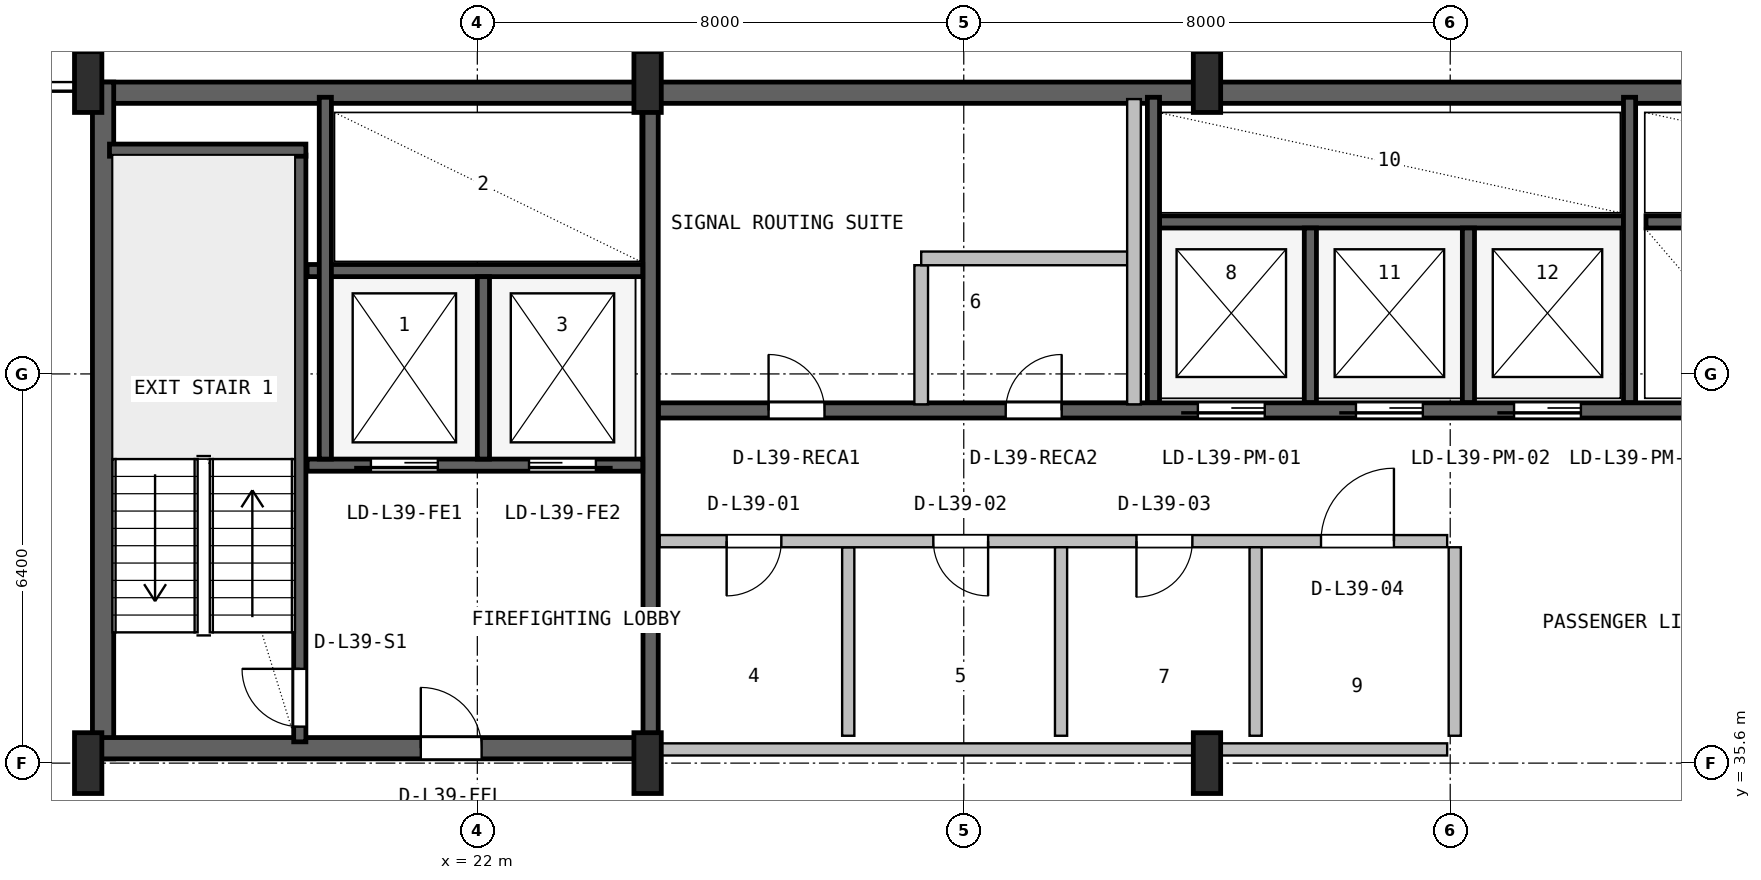
"""IFC4 building model, lengths in metres.
Left out: names, types, materials, properties, quantities, classifications, styles, units other than length and angle.
Written with IfcOpenShell. Run it as: python <this file> out.ifc"""

import sys

from ifc_helpers import new_model, si_unit, direction, frame, frame_2d, origin, origin_2d, place, context, subcontext, project, spatial, rectangle, i_section, extrude, source, transform, mapped, element, fill, save


model = new_model("IFC4")
c1 = context("Model", 3, precision=1e-05, world=origin(), true_north=direction((0.0, 1.0)))
c2 = subcontext(c1, "Body", "Model", "MODEL_VIEW")
j1 = project(units=[si_unit("LENGTHUNIT", "METRE"), si_unit("PLANEANGLEUNIT", "RADIAN")], contexts=[c1])
p1 = place(None, origin())
s1 = spatial("IfcSite", under=j1, at=p1, CompositionType="ELEMENT")
p2 = place(p1, origin())
s2 = spatial("IfcBuilding", under=s1, at=p2, CompositionType="ELEMENT")
p3 = place(p2, frame((0.0, 0.0, 161.0)))
s3 = spatial("IfcBuildingStorey", under=s2, at=p3, CompositionType="ELEMENT", Elevation=161.0)
p4 = place(p3, frame((15.6, 46.625, 0.0), z_axis=(0.0, 0.0, 1.0), x_axis=(1.0, 0.0, 0.0)))
e1 = element("IfcWall", 1, at=p4, inside=s3, PredefinedType="SHEAR", context=c2, shape_type="SweptSolid", body=[
    extrude(rectangle(XDim=36.8, YDim=0.35, at=frame_2d((18.4, 0.0))), origin(), (0.0, 0.0, 1.0), 3.55),
])
p5 = place(p3, frame((15.845, 35.67, 0.0), z_axis=(0.0, 0.0, 1.0), x_axis=(0.0, 1.0, 0.0)))
e2 = element("IfcWall", 2, at=p5, inside=s3, PredefinedType="SHEAR", context=c2, shape_type="SweptSolid", body=[
    extrude(rectangle(XDim=11.13, YDim=0.35, at=frame_2d((5.565, 0.0))), origin(), (0.0, 0.0, 1.0), 3.55),
])
p6 = place(p3, frame((15.67, 35.845, 0.0), z_axis=(0.0, 0.0, 1.0), x_axis=(1.0, 0.0, 0.0)))
e3 = element("IfcWall", 3, at=p6, inside=s3, PredefinedType="SHEAR", context=c2, shape_type="SweptSolid", body=[
    extrude(rectangle(XDim=9.13, YDim=0.35, at=frame_2d((4.565, 0.0))), origin(), (0.0, 0.0, 1.0), 3.55),
])
p7 = place(p6, frame((5.4, 0.0, 0.0)))
e4 = element("IfcOpeningElement", 4, at=p7, cuts=e3, PredefinedType="OPENING", context=c2, shape_type="SweptSolid", body=[
    extrude(rectangle(XDim=1.0, YDim=2.1, at=frame_2d((0.5, 1.05))), frame((0.0, 0.185, 0.0), z_axis=(0.0, -1.0, 0.0), x_axis=(1.0, 0.0, 0.0)), (0.0, 0.0, 1.0), 0.37),
])
m1 = source(origin(), c2, "Body", "SweptSolid", [
    extrude(i_section(OverallWidth=0.45, OverallDepth=1.0, WebThickness=0.016, FlangeThickness=0.03, FilletRadius=0.016, at=origin_2d()), origin(), (0.0, 0.0, 1.0), 3.8),
])
for number, where, z_axis, x_axis in (
    (5, (15.6, 35.6, 0.0), (0.0, 0.0, 1.0), (1.0, 0.0, 0.0)),
    (6, (15.6, 46.8, 0.0), (0.0, 0.0, 1.0), (1.0, 0.0, 0.0)),
    (7, (24.8, 35.6, 0.0), (0.0, 0.0, 1.0), (1.0, 0.0, 0.0)),
    (8, (24.8, 46.8, 0.0), (0.0, 0.0, 1.0), (1.0, 0.0, 0.0)),
    (9, (34.0, 35.6, 0.0), (0.0, 0.0, 1.0), (1.0, 0.0, 0.0)),
    (10, (34.0, 46.8, 0.0), (0.0, 0.0, 1.0), (1.0, 0.0, 0.0)),
):
    element("IfcColumn", number, at=place(p3, frame(where, z_axis=z_axis, x_axis=x_axis)), inside=s3, PredefinedType="COLUMN", context=c2, shape_type="MappedRepresentation", body=[
        mapped(m1, transform((0.0, 0.0, 0.0), x_axis=(1.0, 0.0, 0.0), y_axis=(0.0, 1.0, 0.0), z_axis=(0.0, 0.0, 1.0), scale=1.0)),
    ])
p8 = place(p3, frame((19.08, 35.95, 0.0), z_axis=(0.0, 0.0, 1.0), x_axis=(0.0, 1.0, 0.0)))
e11 = element("IfcWall", 11, at=p8, inside=s3, PredefinedType="SHEAR", context=c2, shape_type="SweptSolid", body=[
    extrude(rectangle(XDim=9.65, YDim=0.2, at=frame_2d((4.825, 0.0))), origin(), (0.0, 0.0, 1.0), 3.55),
])
p9 = place(p8, frame((0.25, 0.0, 0.0)))
e12 = element("IfcOpeningElement", 12, at=p9, cuts=e11, PredefinedType="OPENING", context=c2, shape_type="SweptSolid", body=[
    extrude(rectangle(XDim=0.95, YDim=2.1, at=frame_2d((0.475, 1.05))), frame((0.0, 0.11, 0.0), z_axis=(0.0, -1.0, 0.0), x_axis=(1.0, 0.0, 0.0)), (0.0, 0.0, 1.0), 0.22),
])
p10 = place(p3, frame((15.95, 45.68, 0.0), z_axis=(0.0, 0.0, 1.0), x_axis=(1.0, 0.0, 0.0)))
e13 = element("IfcWall", 13, at=p10, inside=s3, PredefinedType="SHEAR", context=c2, shape_type="SweptSolid", body=[
    extrude(rectangle(XDim=3.23, YDim=0.2, at=frame_2d((1.615, 0.0))), origin(), (0.0, 0.0, 1.0), 3.55),
])
p11 = place(p3, frame((24.85, 36.05, 0.0), z_axis=(0.0, 0.0, 1.0), x_axis=(0.0, 1.0, 0.0)))
e14 = element("IfcWall", 14, at=p11, inside=s3, PredefinedType="SHEAR", context=c2, shape_type="SweptSolid", body=[
    extrude(rectangle(XDim=10.45, YDim=0.25, at=frame_2d((5.225, 0.0))), origin(), (0.0, 0.0, 1.0), 3.55),
])
p12 = place(p3, frame((19.2, 40.5, 0.0), z_axis=(0.0, 0.0, 1.0), x_axis=(1.0, 0.0, 0.0)))
e15 = element("IfcWall", 15, at=p12, inside=s3, PredefinedType="SHEAR", context=c2, shape_type="SweptSolid", body=[
    extrude(rectangle(XDim=5.52, YDim=0.2, at=frame_2d((2.76, 0.0))), origin(), (0.0, 0.0, 1.0), 3.55),
])
p13 = place(p12, frame((1.05, 0.0, 0.0)))
e16 = element("IfcOpeningElement", 16, at=p13, cuts=e15, PredefinedType="OPENING", context=c2, shape_type="SweptSolid", body=[
    extrude(rectangle(XDim=1.1, YDim=2.18, at=frame_2d((0.55, 1.09))), frame((0.0, 0.11, 0.0), z_axis=(0.0, -1.0, 0.0), x_axis=(1.0, 0.0, 0.0)), (0.0, 0.0, 1.0), 0.22),
])
p14 = place(p12, frame((3.65, 0.0, 0.0)))
e17 = element("IfcOpeningElement", 17, at=p14, cuts=e15, PredefinedType="OPENING", context=c2, shape_type="SweptSolid", body=[
    extrude(rectangle(XDim=1.1, YDim=2.18, at=frame_2d((0.55, 1.09))), frame((0.0, 0.11, 0.0), z_axis=(0.0, -1.0, 0.0), x_axis=(1.0, 0.0, 0.0)), (0.0, 0.0, 1.0), 0.22),
])
p15 = place(p3, frame((19.2, 43.7, 0.0), z_axis=(0.0, 0.0, 1.0), x_axis=(1.0, 0.0, 0.0)))
e18 = element("IfcWall", 18, at=p15, inside=s3, PredefinedType="SHEAR", context=c2, shape_type="SweptSolid", body=[
    extrude(rectangle(XDim=5.52, YDim=0.2, at=frame_2d((2.76, 0.0))), origin(), (0.0, 0.0, 1.0), 3.55),
])
p16 = place(p3, frame((22.1, 40.6, 0.0), z_axis=(0.0, 0.0, 1.0), x_axis=(0.0, 1.0, 0.0)))
e19 = element("IfcWall", 19, at=p16, inside=s3, PredefinedType="SHEAR", context=c2, shape_type="SweptSolid", body=[
    extrude(rectangle(XDim=3.0, YDim=0.2, at=frame_2d((1.5, 0.0))), origin(), (0.0, 0.0, 1.0), 3.55),
])
p17 = place(p3, frame((19.5, 40.6, 0.0), z_axis=(0.0, 0.0, 1.0), x_axis=(0.0, 1.0, 0.0)))
e20 = element("IfcWall", 20, at=p17, inside=s3, PredefinedType="SHEAR", context=c2, shape_type="SweptSolid", body=[
    extrude(rectangle(XDim=5.95, YDim=0.2, at=frame_2d((2.975, 0.0))), origin(), (0.0, 0.0, 1.0), 3.55),
])
p18 = place(p3, frame((24.98, 41.4, 0.0), z_axis=(0.0, 0.0, 1.0), x_axis=(1.0, 0.0, 0.0)))
e21 = element("IfcWall", 21, at=p18, inside=s3, PredefinedType="SHEAR", context=c2, shape_type="SweptSolid", body=[
    extrude(rectangle(XDim=23.82, YDim=0.25, at=frame_2d((11.91, 0.0))), origin(), (0.0, 0.0, 1.0), 3.55),
])
p19 = place(p18, frame((8.87, 0.0, 0.0)))
e22 = element("IfcOpeningElement", 22, at=p19, cuts=e21, PredefinedType="OPENING", context=c2, shape_type="SweptSolid", body=[
    extrude(rectangle(XDim=1.1, YDim=2.18, at=frame_2d((0.55, 1.09))), frame((0.0, 0.135, 0.0), z_axis=(0.0, -1.0, 0.0), x_axis=(1.0, 0.0, 0.0)), (0.0, 0.0, 1.0), 0.27),
])
p20 = place(p18, frame((11.47, 0.0, 0.0)))
e23 = element("IfcOpeningElement", 23, at=p20, cuts=e21, PredefinedType="OPENING", context=c2, shape_type="SweptSolid", body=[
    extrude(rectangle(XDim=1.1, YDim=2.18, at=frame_2d((0.55, 1.09))), frame((0.0, 0.135, 0.0), z_axis=(0.0, -1.0, 0.0), x_axis=(1.0, 0.0, 0.0)), (0.0, 0.0, 1.0), 0.27),
])
p21 = place(p18, frame((14.07, 0.0, 0.0)))
e24 = element("IfcOpeningElement", 24, at=p21, cuts=e21, PredefinedType="OPENING", context=c2, shape_type="SweptSolid", body=[
    extrude(rectangle(XDim=1.1, YDim=2.18, at=frame_2d((0.55, 1.09))), frame((0.0, 0.135, 0.0), z_axis=(0.0, -1.0, 0.0), x_axis=(1.0, 0.0, 0.0)), (0.0, 0.0, 1.0), 0.27),
])
p22 = place(p18, frame((1.81, 0.0, 0.0)))
e25 = element("IfcOpeningElement", 25, at=p22, cuts=e21, PredefinedType="OPENING", context=c2, shape_type="SweptSolid", body=[
    extrude(rectangle(XDim=0.92, YDim=2.08, at=frame_2d((0.46, 1.04))), frame((0.0, 0.135, 0.0), z_axis=(0.0, -1.0, 0.0), x_axis=(1.0, 0.0, 0.0)), (0.0, 0.0, 1.0), 0.27),
])
p23 = place(p18, frame((5.71, 0.0, 0.0)))
e26 = element("IfcOpeningElement", 26, at=p23, cuts=e21, PredefinedType="OPENING", context=c2, shape_type="SweptSolid", body=[
    extrude(rectangle(XDim=0.92, YDim=2.08, at=frame_2d((0.46, 1.04))), frame((0.0, 0.135, 0.0), z_axis=(0.0, -1.0, 0.0), x_axis=(1.0, 0.0, 0.0)), (0.0, 0.0, 1.0), 0.27),
])
p24 = place(p3, frame((33.22, 44.5, 0.0), z_axis=(0.0, 0.0, 1.0), x_axis=(1.0, 0.0, 0.0)))
e27 = element("IfcWall", 27, at=p24, inside=s3, PredefinedType="SHEAR", context=c2, shape_type="SweptSolid", body=[
    extrude(rectangle(XDim=7.63, YDim=0.2, at=frame_2d((3.815, 0.0))), origin(), (0.0, 0.0, 1.0), 3.55),
])
p25 = place(p3, frame((33.12, 41.53, 0.0), z_axis=(0.0, 0.0, 1.0), x_axis=(0.0, 1.0, 0.0)))
e28 = element("IfcWall", 28, at=p25, inside=s3, PredefinedType="SHEAR", context=c2, shape_type="SweptSolid", body=[
    extrude(rectangle(XDim=5.02, YDim=0.2, at=frame_2d((2.51, 0.0))), origin(), (0.0, 0.0, 1.0), 3.55),
])
for number, where, z_axis, x_axis in (
    (29, (35.7, 41.53, 0.0), (0.0, 0.0, 1.0), (0.0, 1.0, 0.0)),
    (30, (38.3, 41.53, 0.0), (0.0, 0.0, 1.0), (0.0, 1.0, 0.0)),
):
    element("IfcWall", number, at=place(p3, frame(where, z_axis=z_axis, x_axis=x_axis)), inside=s3, PredefinedType="SHEAR", context=c2, shape_type="SweptSolid", body=[
        extrude(rectangle(XDim=2.87, YDim=0.2, at=frame_2d((1.435, 0.0))), origin(), (0.0, 0.0, 1.0), 3.55),
    ])
p26 = place(p3, frame((40.95, 41.53, 0.0), z_axis=(0.0, 0.0, 1.0), x_axis=(0.0, 1.0, 0.0)))
e31 = element("IfcWall", 31, at=p26, inside=s3, PredefinedType="SHEAR", context=c2, shape_type="SweptSolid", body=[
    extrude(rectangle(XDim=5.02, YDim=0.2, at=frame_2d((2.51, 0.0))), origin(), (0.0, 0.0, 1.0), 3.55),
])
p27 = place(p3, frame((41.22, 44.5, 0.0), z_axis=(0.0, 0.0, 1.0), x_axis=(1.0, 0.0, 0.0)))
e32 = element("IfcWall", 32, at=p27, inside=s3, PredefinedType="SHEAR", context=c2, shape_type="SweptSolid", body=[
    extrude(rectangle(XDim=7.58, YDim=0.2, at=frame_2d((3.79, 0.0))), origin(), (0.0, 0.0, 1.0), 3.55),
])
p28 = place(p3, frame((25.0, 35.825, 0.0), z_axis=(0.0, 0.0, 1.0), x_axis=(1.0, 0.0, 0.0)))
e33 = element("IfcWall", 33, at=p28, inside=s3, PredefinedType="SOLIDWALL", context=c2, shape_type="SweptSolid", body=[
    extrude(rectangle(XDim=12.95, YDim=0.2, at=frame_2d((6.475, 0.0))), origin(), (0.0, 0.0, 1.0), 2.575),
])
p29 = place(p3, frame((28.1, 36.05, 0.0), z_axis=(0.0, 0.0, 1.0), x_axis=(0.0, 1.0, 0.0)))
e34 = element("IfcWall", 34, at=p29, inside=s3, PredefinedType="PLUMBINGWALL", context=c2, shape_type="SweptSolid", body=[
    extrude(rectangle(XDim=3.1, YDim=0.2, at=frame_2d((1.55, 0.0))), origin(), (0.0, 0.0, 1.0), 3.53),
])
p30 = place(p3, frame((25.0, 39.25, 0.0), z_axis=(0.0, 0.0, 1.0), x_axis=(1.0, 0.0, 0.0)))
e35 = element("IfcWall", 35, at=p30, inside=s3, PredefinedType="SOLIDWALL", context=c2, shape_type="SweptSolid", body=[
    extrude(rectangle(XDim=12.95, YDim=0.2, at=frame_2d((6.475, 0.0))), origin(), (0.0, 0.0, 1.0), 3.53),
])
p31 = place(p30, frame((1.1, 0.0, 0.0)))
e36 = element("IfcOpeningElement", 36, at=p31, cuts=e35, PredefinedType="OPENING", context=c2, shape_type="SweptSolid", body=[
    extrude(rectangle(XDim=0.9, YDim=2.06, at=frame_2d((0.45, 1.03))), frame((0.0, 0.11, 0.0), z_axis=(0.0, -1.0, 0.0), x_axis=(1.0, 0.0, 0.0)), (0.0, 0.0, 1.0), 0.22),
])
p32 = place(p30, frame((4.5, 0.0, 0.0)))
e37 = element("IfcOpeningElement", 37, at=p32, cuts=e35, PredefinedType="OPENING", context=c2, shape_type="SweptSolid", body=[
    extrude(rectangle(XDim=0.9, YDim=2.06, at=frame_2d((0.45, 1.03))), frame((0.0, 0.11, 0.0), z_axis=(0.0, -1.0, 0.0), x_axis=(1.0, 0.0, 0.0)), (0.0, 0.0, 1.0), 0.22),
])
p33 = place(p30, frame((7.84, 0.0, 0.0)))
e38 = element("IfcOpeningElement", 38, at=p33, cuts=e35, PredefinedType="OPENING", context=c2, shape_type="SweptSolid", body=[
    extrude(rectangle(XDim=0.92, YDim=2.08, at=frame_2d((0.46, 1.04))), frame((0.0, 0.11, 0.0), z_axis=(0.0, -1.0, 0.0), x_axis=(1.0, 0.0, 0.0)), (0.0, 0.0, 1.0), 0.22),
])
p34 = place(p30, frame((10.875, 0.0, 0.0)))
e39 = element("IfcOpeningElement", 39, at=p34, cuts=e35, PredefinedType="OPENING", context=c2, shape_type="SweptSolid", body=[
    extrude(rectangle(XDim=1.2, YDim=2.1, at=frame_2d((0.6, 1.05))), frame((0.0, 0.11, 0.0), z_axis=(0.0, -1.0, 0.0), x_axis=(1.0, 0.0, 0.0)), (0.0, 0.0, 1.0), 0.22),
])
p35 = place(p3, frame((31.6, 36.05, 0.0), z_axis=(0.0, 0.0, 1.0), x_axis=(0.0, 1.0, 0.0)))
e40 = element("IfcWall", 40, at=p35, inside=s3, PredefinedType="PLUMBINGWALL", context=c2, shape_type="SweptSolid", body=[
    extrude(rectangle(XDim=3.1, YDim=0.2, at=frame_2d((1.55, 0.0))), origin(), (0.0, 0.0, 1.0), 3.53),
])
for number, where, z_axis, x_axis in (
    (41, (34.8, 36.05, 0.0), (0.0, 0.0, 1.0), (0.0, 1.0, 0.0)),
    (42, (38.075, 36.05, 0.0), (0.0, 0.0, 1.0), (0.0, 1.0, 0.0)),
):
    element("IfcWall", number, at=place(p3, frame(where, z_axis=z_axis, x_axis=x_axis)), inside=s3, PredefinedType="SOLIDWALL", context=c2, shape_type="SweptSolid", body=[
        extrude(rectangle(XDim=3.1, YDim=0.2, at=frame_2d((1.55, 0.0))), origin(), (0.0, 0.0, 1.0), 3.53),
    ])
p36 = place(p3, frame((29.3, 41.5, 0.0), z_axis=(0.0, 0.0, 1.0), x_axis=(0.0, 1.0, 0.0)))
e43 = element("IfcWall", 43, at=p36, inside=s3, PredefinedType="PARTITIONING", context=c2, shape_type="SweptSolid", body=[
    extrude(rectangle(XDim=2.288, YDim=0.225, at=frame_2d((1.144, 0.0))), origin(), (0.0, 0.0, 1.0), 3.53),
])
p37 = place(p3, frame((29.3, 43.9, 0.0), z_axis=(0.0, 0.0, 1.0), x_axis=(1.0, 0.0, 0.0)))
e44 = element("IfcWall", 44, at=p37, inside=s3, PredefinedType="PARTITIONING", context=c2, shape_type="SweptSolid", body=[
    extrude(rectangle(XDim=3.5, YDim=0.225, at=frame_2d((1.75, 0.0))), origin(), (0.0, 0.0, 1.0), 3.53),
])
p38 = place(p3, frame((32.8, 41.5, 0.0), z_axis=(0.0, 0.0, 1.0), x_axis=(0.0, 1.0, 0.0)))
e45 = element("IfcWall", 45, at=p38, inside=s3, PredefinedType="PARTITIONING", context=c2, shape_type="SweptSolid", body=[
    extrude(rectangle(XDim=5.02, YDim=0.225, at=frame_2d((2.51, 0.0))), origin(), (0.0, 0.0, 1.0), 3.53),
])
m2 = source(origin(), c2, "Body", "SweptSolid", [
    extrude(rectangle(XDim=0.95, YDim=2.1, at=frame_2d((0.475, 1.05))), frame((0.0, 0.025, 0.0), z_axis=(0.0, -1.0, 0.0), x_axis=(1.0, 0.0, 0.0)), (0.0, 0.0, 1.0), 0.05),
])
p39 = place(p9, origin())
e46 = element("IfcDoor", 46, at=p39, inside=s3, OperationType="SINGLE_SWING_RIGHT", PredefinedType="DOOR", context=c2, shape_type="MappedRepresentation", body=[
    mapped(m2, transform((0.0, 0.0, 0.0), x_axis=(1.0, 0.0, 0.0), y_axis=(0.0, 1.0, 0.0), z_axis=(0.0, 0.0, 1.0), scale=1.0)),
])
fill(e12, e46)
m3 = source(origin(), c2, "Body", "SweptSolid", [
    extrude(rectangle(XDim=1.0, YDim=2.1, at=frame_2d((0.5, 1.05))), frame((0.0, 0.025, 0.0), z_axis=(0.0, -1.0, 0.0), x_axis=(1.0, 0.0, 0.0)), (0.0, 0.0, 1.0), 0.05),
])
p40 = place(p7, origin())
e47 = element("IfcDoor", 47, at=p40, inside=s3, OperationType="SINGLE_SWING_LEFT", PredefinedType="DOOR", context=c2, shape_type="MappedRepresentation", body=[
    mapped(m3, transform((0.0, 0.0, 0.0), x_axis=(1.0, 0.0, 0.0), y_axis=(0.0, 1.0, 0.0), z_axis=(0.0, 0.0, 1.0), scale=1.0)),
])
fill(e4, e47)
m4 = source(origin(), c2, "Body", "SweptSolid", [
    extrude(rectangle(XDim=1.1, YDim=2.18, at=frame_2d((0.55, 1.09))), frame((0.0, 0.025, 0.0), z_axis=(0.0, -1.0, 0.0), x_axis=(1.0, 0.0, 0.0)), (0.0, 0.0, 1.0), 0.05),
])
p41 = place(p13, frame((1.1, 0.0, 0.0), z_axis=(0.0, 0.0, 1.0), x_axis=(-1.0, 0.0, 0.0)))
e48 = element("IfcDoor", 48, at=p41, inside=s3, OperationType="SLIDING_TO_LEFT", PredefinedType="DOOR", context=c2, shape_type="MappedRepresentation", body=[
    mapped(m4, transform((0.0, 0.0, 0.0), x_axis=(1.0, 0.0, 0.0), y_axis=(0.0, 1.0, 0.0), z_axis=(0.0, 0.0, 1.0), scale=1.0)),
])
fill(e16, e48)
p42 = place(p14, frame((1.1, 0.0, 0.0), z_axis=(0.0, 0.0, 1.0), x_axis=(-1.0, 0.0, 0.0)))
e49 = element("IfcDoor", 49, at=p42, inside=s3, OperationType="SLIDING_TO_RIGHT", PredefinedType="DOOR", context=c2, shape_type="MappedRepresentation", body=[
    mapped(m4, transform((0.0, 0.0, 0.0), x_axis=(1.0, 0.0, 0.0), y_axis=(0.0, 1.0, 0.0), z_axis=(0.0, 0.0, 1.0), scale=1.0)),
])
fill(e17, e49)
p43 = place(p19, frame((1.1, 0.0, 0.0), z_axis=(0.0, 0.0, 1.0), x_axis=(-1.0, 0.0, 0.0)))
e50 = element("IfcDoor", 50, at=p43, inside=s3, OperationType="SLIDING_TO_LEFT", PredefinedType="DOOR", context=c2, shape_type="MappedRepresentation", body=[
    mapped(m4, transform((0.0, 0.0, 0.0), x_axis=(1.0, 0.0, 0.0), y_axis=(0.0, 1.0, 0.0), z_axis=(0.0, 0.0, 1.0), scale=1.0)),
])
fill(e22, e50)
p44 = place(p20, frame((1.1, 0.0, 0.0), z_axis=(0.0, 0.0, 1.0), x_axis=(-1.0, 0.0, 0.0)))
e51 = element("IfcDoor", 51, at=p44, inside=s3, OperationType="SLIDING_TO_LEFT", PredefinedType="DOOR", context=c2, shape_type="MappedRepresentation", body=[
    mapped(m4, transform((0.0, 0.0, 0.0), x_axis=(1.0, 0.0, 0.0), y_axis=(0.0, 1.0, 0.0), z_axis=(0.0, 0.0, 1.0), scale=1.0)),
])
fill(e23, e51)
p45 = place(p21, frame((1.1, 0.0, 0.0), z_axis=(0.0, 0.0, 1.0), x_axis=(-1.0, 0.0, 0.0)))
e52 = element("IfcDoor", 52, at=p45, inside=s3, OperationType="SLIDING_TO_LEFT", PredefinedType="DOOR", context=c2, shape_type="MappedRepresentation", body=[
    mapped(m4, transform((0.0, 0.0, 0.0), x_axis=(1.0, 0.0, 0.0), y_axis=(0.0, 1.0, 0.0), z_axis=(0.0, 0.0, 1.0), scale=1.0)),
])
fill(e24, e52)
m5 = source(origin(), c2, "Body", "SweptSolid", [
    extrude(rectangle(XDim=0.92, YDim=2.08, at=frame_2d((0.46, 1.04))), frame((0.0, 0.025, 0.0), z_axis=(0.0, -1.0, 0.0), x_axis=(1.0, 0.0, 0.0)), (0.0, 0.0, 1.0), 0.05),
])
p46 = place(p22, origin())
e53 = element("IfcDoor", 53, at=p46, inside=s3, OperationType="SINGLE_SWING_LEFT", PredefinedType="DOOR", context=c2, shape_type="MappedRepresentation", body=[
    mapped(m5, transform((0.0, 0.0, 0.0), x_axis=(1.0, 0.0, 0.0), y_axis=(0.0, 1.0, 0.0), z_axis=(0.0, 0.0, 1.0), scale=1.0)),
])
fill(e25, e53)
p47 = place(p23, origin())
e54 = element("IfcDoor", 54, at=p47, inside=s3, OperationType="SINGLE_SWING_RIGHT", PredefinedType="DOOR", context=c2, shape_type="MappedRepresentation", body=[
    mapped(m5, transform((0.0, 0.0, 0.0), x_axis=(1.0, 0.0, 0.0), y_axis=(0.0, 1.0, 0.0), z_axis=(0.0, 0.0, 1.0), scale=1.0)),
])
fill(e26, e54)
m6 = source(origin(), c2, "Body", "SweptSolid", [
    extrude(rectangle(XDim=0.9, YDim=2.06, at=frame_2d((0.45, 1.03))), frame((0.0, 0.025, 0.0), z_axis=(0.0, -1.0, 0.0), x_axis=(1.0, 0.0, 0.0)), (0.0, 0.0, 1.0), 0.05),
])
p48 = place(p31, frame((0.9, 0.0, 0.0), z_axis=(0.0, 0.0, 1.0), x_axis=(-1.0, 0.0, 0.0)))
e55 = element("IfcDoor", 55, at=p48, inside=s3, OperationType="SINGLE_SWING_LEFT", PredefinedType="DOOR", context=c2, shape_type="MappedRepresentation", body=[
    mapped(m6, transform((0.0, 0.0, 0.0), x_axis=(1.0, 0.0, 0.0), y_axis=(0.0, 1.0, 0.0), z_axis=(0.0, 0.0, 1.0), scale=1.0)),
])
fill(e36, e55)
p49 = place(p32, frame((0.9, 0.0, 0.0), z_axis=(0.0, 0.0, 1.0), x_axis=(-1.0, 0.0, 0.0)))
e56 = element("IfcDoor", 56, at=p49, inside=s3, OperationType="SINGLE_SWING_RIGHT", PredefinedType="DOOR", context=c2, shape_type="MappedRepresentation", body=[
    mapped(m6, transform((0.0, 0.0, 0.0), x_axis=(1.0, 0.0, 0.0), y_axis=(0.0, 1.0, 0.0), z_axis=(0.0, 0.0, 1.0), scale=1.0)),
])
fill(e37, e56)
p50 = place(p33, frame((0.92, 0.0, 0.0), z_axis=(0.0, 0.0, 1.0), x_axis=(-1.0, 0.0, 0.0)))
e57 = element("IfcDoor", 57, at=p50, inside=s3, OperationType="SINGLE_SWING_LEFT", PredefinedType="DOOR", context=c2, shape_type="MappedRepresentation", body=[
    mapped(m5, transform((0.0, 0.0, 0.0), x_axis=(1.0, 0.0, 0.0), y_axis=(0.0, 1.0, 0.0), z_axis=(0.0, 0.0, 1.0), scale=1.0)),
])
fill(e38, e57)
m7 = source(origin(), c2, "Body", "SweptSolid", [
    extrude(rectangle(XDim=1.2, YDim=2.1, at=frame_2d((0.6, 1.05))), frame((0.0, 0.025, 0.0), z_axis=(0.0, -1.0, 0.0), x_axis=(1.0, 0.0, 0.0)), (0.0, 0.0, 1.0), 0.05),
])
p51 = place(p34, origin())
e58 = element("IfcDoor", 58, at=p51, inside=s3, OperationType="SINGLE_SWING_RIGHT", PredefinedType="DOOR", context=c2, shape_type="MappedRepresentation", body=[
    mapped(m7, transform((0.0, 0.0, 0.0), x_axis=(1.0, 0.0, 0.0), y_axis=(0.0, 1.0, 0.0), z_axis=(0.0, 0.0, 1.0), scale=1.0)),
])
fill(e39, e58)
save(model, sys.argv[1])
